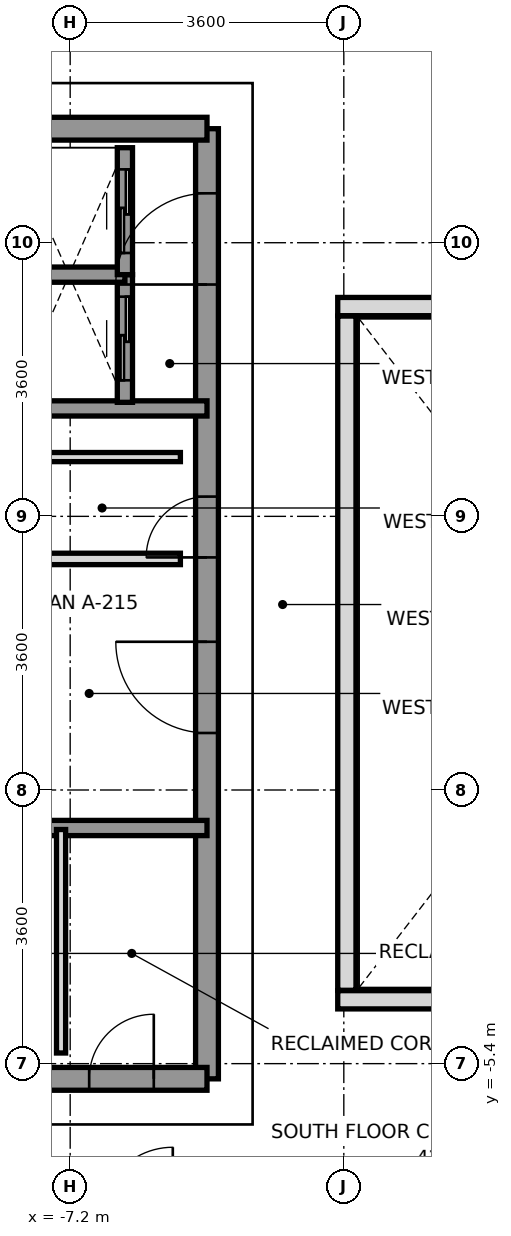
"""IFC4 building model, lengths in metres.
Left out: names, types, materials, properties, quantities, classifications, styles, units other than length and angle.
Written with IfcOpenShell. Run it as: python <this file> out.ifc"""

import sys

from ifc_helpers import new_model, si_unit, direction, frame, frame_2d, origin, place, context, subcontext, project, spatial, rectangle, extrude, source, transform, mapped, element, fill, save


model = new_model("IFC4")
c1 = context("Model", 3, precision=1e-05, world=origin(), true_north=direction((0.0, 1.0)))
c2 = subcontext(c1, "Body", "Model", "MODEL_VIEW")
j1 = project(units=[si_unit("LENGTHUNIT", "METRE"), si_unit("PLANEANGLEUNIT", "RADIAN")], contexts=[c1])
p1 = place(None, origin())
s1 = spatial("IfcSite", under=j1, at=p1, CompositionType="ELEMENT")
p2 = place(p1, origin())
s2 = spatial("IfcBuilding", under=s1, at=p2, CompositionType="ELEMENT")
p3 = place(p2, frame((0.0, 0.0, 258.8)))
s3 = spatial("IfcBuildingStorey", under=s2, at=p3, CompositionType="ELEMENT", Elevation=258.8)
p4 = place(p3, frame((-5.4, -5.6, 0.0), z_axis=(0.0, 0.0, 1.0), x_axis=(0.0, 1.0, 0.0)))
e1 = element("IfcWall", 1, at=p4, inside=s3, PredefinedType="SHEAR", context=c2, shape_type="SweptSolid", body=[
    extrude(rectangle(XDim=12.5, YDim=0.3, at=frame_2d((6.25, 0.0))), origin(), (0.0, 0.0, 1.0), 3.01),
])
p5 = place(p4, frame((4.55, 0.0, 0.0)))
e2 = element("IfcOpeningElement", 2, at=p5, cuts=e1, PredefinedType="OPENING", context=c2, shape_type="SweptSolid", body=[
    extrude(rectangle(XDim=1.2, YDim=2.2, at=frame_2d((0.6, 1.1))), frame((0.0, 0.16, 0.0), z_axis=(0.0, -1.0, 0.0), x_axis=(1.0, 0.0, 0.0)), (0.0, 0.0, 1.0), 0.32),
])
p6 = place(p4, frame((10.45, 0.0, 0.0)))
e3 = element("IfcOpeningElement", 3, at=p6, cuts=e1, PredefinedType="OPENING", context=c2, shape_type="SweptSolid", body=[
    extrude(rectangle(XDim=1.2, YDim=2.2, at=frame_2d((0.6, 1.1))), frame((0.0, 0.16, 0.0), z_axis=(0.0, -1.0, 0.0), x_axis=(1.0, 0.0, 0.0)), (0.0, 0.0, 1.0), 0.32),
])
p7 = place(p4, frame((6.86, 0.0, 0.0)))
e4 = element("IfcOpeningElement", 4, at=p7, cuts=e1, PredefinedType="OPENING", context=c2, shape_type="SweptSolid", body=[
    extrude(rectangle(XDim=0.8, YDim=2.1, at=frame_2d((0.4, 1.05))), frame((0.0, 0.16, 0.0), z_axis=(0.0, -1.0, 0.0), x_axis=(1.0, 0.0, 0.0)), (0.0, 0.0, 1.0), 0.32),
])
p8 = place(p3, frame((-12.35, 6.9, 0.0), z_axis=(0.0, 0.0, 1.0), x_axis=(1.0, 0.0, 0.0)))
e5 = element("IfcWall", 5, at=p8, inside=s3, PredefinedType="SHEAR", context=c2, shape_type="SweptSolid", body=[
    extrude(rectangle(XDim=6.95, YDim=0.3, at=frame_2d((3.475, 0.0))), origin(), (0.0, 0.0, 1.0), 3.01),
])
p9 = place(p3, frame((-12.35, -5.6, 0.0), z_axis=(0.0, 0.0, 1.0), x_axis=(1.0, 0.0, 0.0)))
e6 = element("IfcWall", 6, at=p9, inside=s3, PredefinedType="SHEAR", context=c2, shape_type="SweptSolid", body=[
    extrude(rectangle(XDim=6.95, YDim=0.3, at=frame_2d((3.475, 0.0))), origin(), (0.0, 0.0, 1.0), 3.01),
])
p10 = place(p9, frame((0.2, 0.0, 0.0)))
e7 = element("IfcOpeningElement", 7, at=p10, cuts=e6, PredefinedType="OPENING", context=c2, shape_type="SweptSolid", body=[
    extrude(rectangle(XDim=0.85, YDim=2.1, at=frame_2d((0.425, 1.05))), frame((0.0, 0.16, 0.0), z_axis=(0.0, -1.0, 0.0), x_axis=(1.0, 0.0, 0.0)), (0.0, 0.0, 1.0), 0.32),
])
p11 = place(p9, frame((1.68, 0.0, 0.0)))
e8 = element("IfcOpeningElement", 8, at=p11, cuts=e6, PredefinedType="OPENING", context=c2, shape_type="SweptSolid", body=[
    extrude(rectangle(XDim=0.85, YDim=2.1, at=frame_2d((0.425, 1.05))), frame((0.0, 0.16, 0.0), z_axis=(0.0, -1.0, 0.0), x_axis=(1.0, 0.0, 0.0)), (0.0, 0.0, 1.0), 0.32),
])
p12 = place(p9, frame((3.7, 0.0, 0.0)))
e9 = element("IfcOpeningElement", 9, at=p12, cuts=e6, PredefinedType="OPENING", context=c2, shape_type="SweptSolid", body=[
    extrude(rectangle(XDim=0.85, YDim=2.1, at=frame_2d((0.425, 1.05))), frame((0.0, 0.16, 0.0), z_axis=(0.0, -1.0, 0.0), x_axis=(1.0, 0.0, 0.0)), (0.0, 0.0, 1.0), 0.32),
])
p13 = place(p9, frame((5.4, 0.0, 0.0)))
e10 = element("IfcOpeningElement", 10, at=p13, cuts=e6, PredefinedType="OPENING", context=c2, shape_type="SweptSolid", body=[
    extrude(rectangle(XDim=0.85, YDim=2.1, at=frame_2d((0.425, 1.05))), frame((0.0, 0.16, 0.0), z_axis=(0.0, -1.0, 0.0), x_axis=(1.0, 0.0, 0.0)), (0.0, 0.0, 1.0), 0.32),
])
p14 = place(p3, frame((-8.18, 3.22, 0.0), z_axis=(0.0, 0.0, 1.0), x_axis=(1.0, 0.0, 0.0)))
e11 = element("IfcWall", 11, at=p14, inside=s3, PredefinedType="SOLIDWALL", context=c2, shape_type="SweptSolid", body=[
    extrude(rectangle(XDim=2.78, YDim=0.2, at=frame_2d((1.39, 0.0))), origin(), (0.0, 0.0, 1.0), 3.01),
])
p15 = place(p3, frame((-8.48, -2.3, 0.0), z_axis=(0.0, 0.0, 1.0), x_axis=(1.0, 0.0, 0.0)))
e12 = element("IfcWall", 12, at=p15, inside=s3, PredefinedType="SOLIDWALL", context=c2, shape_type="SweptSolid", body=[
    extrude(rectangle(XDim=3.08, YDim=0.2, at=frame_2d((1.54, 0.0))), origin(), (0.0, 0.0, 1.0), 3.01),
])
p16 = place(p3, frame((-6.48, 3.3, 0.0), z_axis=(0.0, 0.0, 1.0), x_axis=(0.0, 1.0, 0.0)))
e13 = element("IfcWall", 13, at=p16, inside=s3, PredefinedType="SOLIDWALL", context=c2, shape_type="SweptSolid", body=[
    extrude(rectangle(XDim=1.68, YDim=0.2, at=frame_2d((0.84, 0.0))), origin(), (0.0, 0.0, 1.0), 3.01),
])
p17 = place(p16, frame((0.29, 0.0, 0.0)))
e14 = element("IfcOpeningElement", 14, at=p17, cuts=e13, PredefinedType="OPENING", context=c2, shape_type="SweptSolid", body=[
    extrude(rectangle(XDim=1.1, YDim=2.2, at=frame_2d((0.55, 1.1))), frame((0.0, 0.11, 0.0), z_axis=(0.0, -1.0, 0.0), x_axis=(1.0, 0.0, 0.0)), (0.0, 0.0, 1.0), 0.22),
])
p18 = place(p3, frame((-7.95, 4.98, 0.0), z_axis=(0.0, 0.0, 1.0), x_axis=(1.0, 0.0, 0.0)))
e15 = element("IfcWall", 15, at=p18, inside=s3, PredefinedType="SOLIDWALL", context=c2, shape_type="SweptSolid", body=[
    extrude(rectangle(XDim=1.47, YDim=0.2, at=frame_2d((0.735, 0.0))), origin(), (0.0, 0.0, 1.0), 3.01),
])
p19 = place(p3, frame((-6.48, 4.98, 0.0), z_axis=(0.0, 0.0, 1.0), x_axis=(0.0, 1.0, 0.0)))
e16 = element("IfcWall", 16, at=p19, inside=s3, PredefinedType="SOLIDWALL", context=c2, shape_type="SweptSolid", body=[
    extrude(rectangle(XDim=1.67, YDim=0.2, at=frame_2d((0.835, 0.0))), origin(), (0.0, 0.0, 1.0), 3.01),
])
p20 = place(p19, frame((0.285, 0.0, 0.0)))
e17 = element("IfcOpeningElement", 17, at=p20, cuts=e16, PredefinedType="OPENING", context=c2, shape_type="SweptSolid", body=[
    extrude(rectangle(XDim=1.1, YDim=2.2, at=frame_2d((0.55, 1.1))), frame((0.0, 0.11, 0.0), z_axis=(0.0, -1.0, 0.0), x_axis=(1.0, 0.0, 0.0)), (0.0, 0.0, 1.0), 0.22),
])
p21 = place(p3, frame((-8.14, 1.24, 0.0), z_axis=(0.0, 0.0, 1.0), x_axis=(1.0, 0.0, 0.0)))
e18 = element("IfcWall", 18, at=p21, inside=s3, PredefinedType="PARTITIONING", context=c2, shape_type="SweptSolid", body=[
    extrude(rectangle(XDim=2.39, YDim=0.15, at=frame_2d((1.195, 0.0))), origin(), (0.0, 0.0, 1.0), 3.01),
])
p22 = place(p3, frame((-8.14, 2.58, 0.0), z_axis=(0.0, 0.0, 1.0), x_axis=(1.0, 0.0, 0.0)))
e19 = element("IfcWall", 19, at=p22, inside=s3, PredefinedType="PARTITIONING", context=c2, shape_type="SweptSolid", body=[
    extrude(rectangle(XDim=2.39, YDim=0.12, at=frame_2d((1.195, 0.0))), origin(), (0.0, 0.0, 1.0), 3.01),
])
p23 = place(p3, frame((-7.32, -5.26, 0.0), z_axis=(0.0, 0.0, 1.0), x_axis=(0.0, 1.0, 0.0)))
e20 = element("IfcWall", 20, at=p23, inside=s3, PredefinedType="PARTITIONING", context=c2, shape_type="SweptSolid", body=[
    extrude(rectangle(XDim=2.94, YDim=0.12, at=frame_2d((1.47, 0.0))), origin(), (0.0, 0.0, 1.0), 3.01),
])
for number, where, z_axis, x_axis in (
    (21, (-3.68, -4.56, 0.0), (0.0, 0.0, 1.0), (1.0, 0.0, 0.0)),
    (22, (-3.68, 4.56, 0.0), (0.0, 0.0, 1.0), (1.0, 0.0, 0.0)),
):
    element("IfcWall", number, at=place(p3, frame(where, z_axis=z_axis, x_axis=x_axis)), inside=s3, PredefinedType="PARAPET", context=c2, shape_type="SweptSolid", body=[
        extrude(rectangle(XDim=7.36, YDim=0.24, at=frame_2d((3.68, 0.0))), origin(), (0.0, 0.0, 1.0), 1.15),
    ])
p24 = place(p3, frame((-3.56, -4.435, 0.0), z_axis=(0.0, 0.0, 1.0), x_axis=(0.0, 1.0, 0.0)))
e23 = element("IfcWall", 23, at=p24, inside=s3, PredefinedType="PARAPET", context=c2, shape_type="SweptSolid", body=[
    extrude(rectangle(XDim=8.87, YDim=0.24, at=frame_2d((4.435, 0.0))), origin(), (0.0, 0.0, 1.0), 1.15),
])
m1 = source(origin(), c2, "Body", "SweptSolid", [
    extrude(rectangle(XDim=1.2, YDim=2.2, at=frame_2d((0.6, 1.1))), frame((0.0, 0.025, 0.0), z_axis=(0.0, -1.0, 0.0), x_axis=(1.0, 0.0, 0.0)), (0.0, 0.0, 1.0), 0.05),
])
p25 = place(p5, origin())
e24 = element("IfcDoor", 24, at=p25, inside=s3, OperationType="SINGLE_SWING_RIGHT", PredefinedType="DOOR", context=c2, shape_type="MappedRepresentation", body=[
    mapped(m1, transform((0.0, 0.0, 0.0), x_axis=(1.0, 0.0, 0.0), y_axis=(0.0, 1.0, 0.0), z_axis=(0.0, 0.0, 1.0), scale=1.0)),
])
fill(e2, e24)
p26 = place(p6, origin())
e25 = element("IfcDoor", 25, at=p26, inside=s3, OperationType="SINGLE_SWING_LEFT", PredefinedType="DOOR", context=c2, shape_type="MappedRepresentation", body=[
    mapped(m1, transform((0.0, 0.0, 0.0), x_axis=(1.0, 0.0, 0.0), y_axis=(0.0, 1.0, 0.0), z_axis=(0.0, 0.0, 1.0), scale=1.0)),
])
fill(e3, e25)
m2 = source(origin(), c2, "Body", "SweptSolid", [
    extrude(rectangle(XDim=0.8, YDim=2.1, at=frame_2d((0.4, 1.05))), frame((0.0, 0.025, 0.0), z_axis=(0.0, -1.0, 0.0), x_axis=(1.0, 0.0, 0.0)), (0.0, 0.0, 1.0), 0.05),
])
p27 = place(p7, origin())
e26 = element("IfcDoor", 26, at=p27, inside=s3, OperationType="SINGLE_SWING_LEFT", PredefinedType="DOOR", context=c2, shape_type="MappedRepresentation", body=[
    mapped(m2, transform((0.0, 0.0, 0.0), x_axis=(1.0, 0.0, 0.0), y_axis=(0.0, 1.0, 0.0), z_axis=(0.0, 0.0, 1.0), scale=1.0)),
])
fill(e4, e26)
m3 = source(origin(), c2, "Body", "SweptSolid", [
    extrude(rectangle(XDim=0.85, YDim=2.1, at=frame_2d((0.425, 1.05))), frame((0.0, 0.025, 0.0), z_axis=(0.0, -1.0, 0.0), x_axis=(1.0, 0.0, 0.0)), (0.0, 0.0, 1.0), 0.05),
])
p28 = place(p13, origin())
e27 = element("IfcDoor", 27, at=p28, inside=s3, OperationType="SINGLE_SWING_RIGHT", PredefinedType="DOOR", context=c2, shape_type="MappedRepresentation", body=[
    mapped(m3, transform((0.0, 0.0, 0.0), x_axis=(1.0, 0.0, 0.0), y_axis=(0.0, 1.0, 0.0), z_axis=(0.0, 0.0, 1.0), scale=1.0)),
])
fill(e10, e27)
m4 = source(origin(), c2, "Body", "SweptSolid", [
    extrude(rectangle(XDim=1.1, YDim=2.2, at=frame_2d((0.55, 1.1))), frame((0.0, 0.025, 0.0), z_axis=(0.0, -1.0, 0.0), x_axis=(1.0, 0.0, 0.0)), (0.0, 0.0, 1.0), 0.05),
])
p29 = place(p17, origin())
e28 = element("IfcDoor", 28, at=p29, inside=s3, OperationType="SLIDING_TO_LEFT", PredefinedType="DOOR", context=c2, shape_type="MappedRepresentation", body=[
    mapped(m4, transform((0.0, 0.0, 0.0), x_axis=(1.0, 0.0, 0.0), y_axis=(0.0, 1.0, 0.0), z_axis=(0.0, 0.0, 1.0), scale=1.0)),
])
fill(e14, e28)
p30 = place(p20, origin())
e29 = element("IfcDoor", 29, at=p30, inside=s3, OperationType="SLIDING_TO_LEFT", PredefinedType="DOOR", context=c2, shape_type="MappedRepresentation", body=[
    mapped(m4, transform((0.0, 0.0, 0.0), x_axis=(1.0, 0.0, 0.0), y_axis=(0.0, 1.0, 0.0), z_axis=(0.0, 0.0, 1.0), scale=1.0)),
])
fill(e17, e29)
save(model, sys.argv[1])
